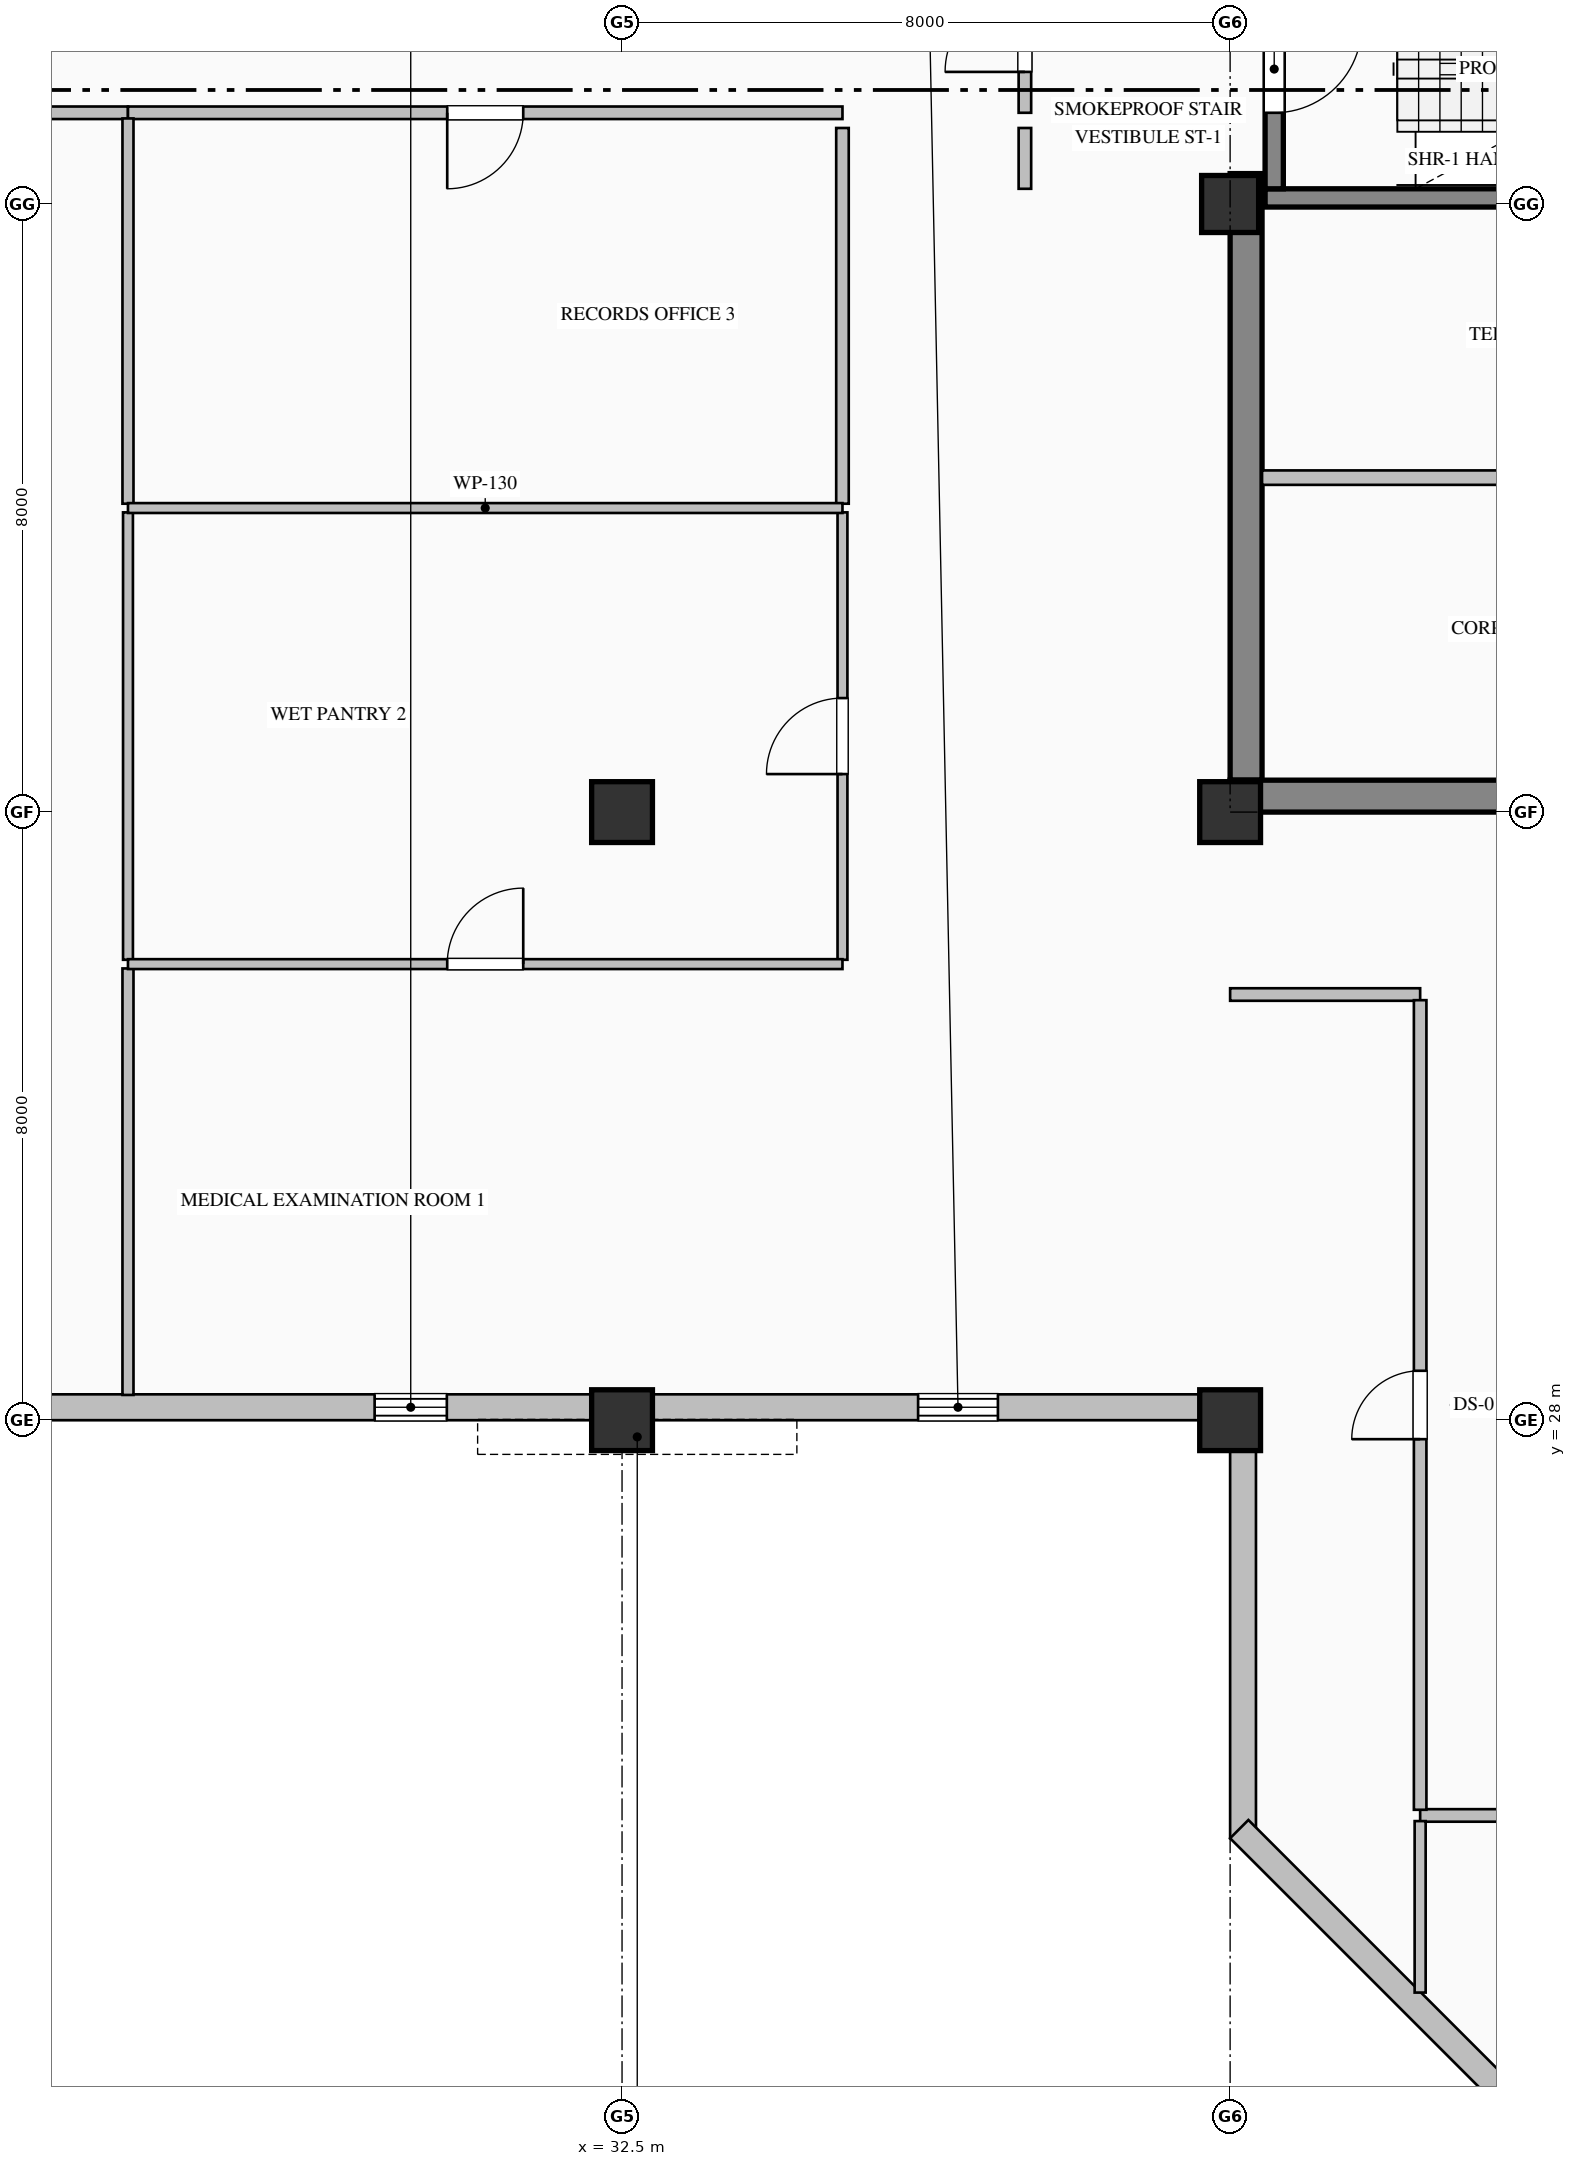
"""IFC4 building model, lengths in metres.
Left out: names, types, materials, properties, quantities, classifications, styles, units other than length and angle.
Written with IfcOpenShell. Run it as: python <this file> out.ifc"""

import sys

from ifc_helpers import new_model, si_unit, direction, frame, frame_2d, origin, origin_2d, place, context, subcontext, project, spatial, rectangle, hollow_rectangle, extrude, element, fill, save


model = new_model("IFC4")
c1 = context("Model", 3, precision=1e-05, world=origin(), true_north=direction((0.0, 1.0)))
c2 = subcontext(c1, "Body", "Model", "MODEL_VIEW")
j1 = project(units=[si_unit("LENGTHUNIT", "METRE"), si_unit("PLANEANGLEUNIT", "RADIAN")], contexts=[c1])
p1 = place(None, origin())
s1 = spatial("IfcSite", under=j1, at=p1, CompositionType="ELEMENT")
p2 = place(p1, origin())
s2 = spatial("IfcBuilding", under=s1, at=p2, CompositionType="ELEMENT")
p3 = place(p2, frame((0.0, 0.0, 347.2)))
s3 = spatial("IfcBuildingStorey", under=s2, at=p3, CompositionType="ELEMENT", Elevation=347.2)
p4 = place(p3, frame((40.71, 36.42, 0.0), z_axis=(0.0, 0.0, 1.0), x_axis=(0.0, 1.0, 0.0)))
e1 = element("IfcWall", 1, at=p4, inside=s3, PredefinedType="SHEAR", context=c2, shape_type="SweptSolid", body=[
    extrude(rectangle(XDim=7.98, YDim=0.42, at=frame_2d((3.99, 0.0))), origin(), (0.0, 0.0, 1.0), 3.785),
])
p5 = place(p3, frame((40.5, 36.21, 0.0), z_axis=(0.0, 0.0, 1.0), x_axis=(1.0, 0.0, 0.0)))
e2 = element("IfcWall", 2, at=p5, inside=s3, PredefinedType="SHEAR", context=c2, shape_type="SweptSolid", body=[
    extrude(rectangle(XDim=9.1, YDim=0.42, at=frame_2d((4.55, 0.0))), origin(), (0.0, 0.0, 1.0), 3.785),
])
for number, where, z_axis, x_axis in (
    (3, (32.5, 28.0, 0.0), (0.0, 0.0, 1.0), (1.0, 0.0, 0.0)),
    (4, (32.5, 36.0, 0.0), (0.0, 0.0, 1.0), (1.0, 0.0, 0.0)),
    (5, (40.5, 28.0, 0.0), (0.0, 0.0, 1.0), (1.0, 0.0, 0.0)),
    (6, (40.5, 36.0, 0.0), (0.0, 0.0, 1.0), (1.0, 0.0, 0.0)),
):
    element("IfcColumn", number, at=place(p3, frame(where, z_axis=z_axis, x_axis=x_axis)), inside=s3, PredefinedType="COLUMN", context=c2, shape_type="SweptSolid", body=[
        extrude(hollow_rectangle(XDim=0.8, YDim=0.8, WallThickness=0.032, at=origin_2d()), origin(), (0.0, 0.0, 1.0), 4.0),
    ])
p6 = place(p3, frame((40.5, 44.0, 0.0), z_axis=(0.0, 0.0, 1.0), x_axis=(1.0, 0.0, 0.0)))
e7 = element("IfcColumn", 7, at=p6, inside=s3, PredefinedType="COLUMN", context=c2, shape_type="SweptSolid", body=[
    extrude(rectangle(XDim=0.75, YDim=0.75, at=origin_2d()), origin(), (0.0, 0.0, 1.0), 4.0),
])
p7 = place(p3, frame((40.67, 22.5, 0.0), z_axis=(0.0, 0.0, 1.0), x_axis=(0.0, 1.0, 0.0)))
e8 = element("IfcWall", 8, at=p7, inside=s3, PredefinedType="SOLIDWALL", context=c2, shape_type="SweptSolid", body=[
    extrude(rectangle(XDim=5.84, YDim=0.34, at=frame_2d((2.92, 0.0))), origin(), (0.0, 0.0, 1.0), 3.185),
])
p8 = place(p3, frame((40.52, 28.17, 0.0), z_axis=(0.0, 0.0, 1.0), x_axis=(-1.0, 0.0, 0.0)))
e9 = element("IfcWall", 9, at=p8, inside=s3, PredefinedType="SOLIDWALL", context=c2, shape_type="SweptSolid", body=[
    extrude(rectangle(XDim=20.02, YDim=0.34, at=frame_2d((10.01, 0.0))), origin(), (0.0, 0.0, 1.0), 3.185),
])
p9 = place(p8, frame((3.075, 0.0, 0.8)))
e10 = element("IfcOpeningElement", 10, at=p9, cuts=e9, PredefinedType="OPENING", context=c2, shape_type="SweptSolid", body=[
    extrude(rectangle(XDim=1.05, YDim=2.15, at=frame_2d((0.525, 1.075))), frame((0.0, 0.18, 0.0), z_axis=(0.0, -1.0, 0.0), x_axis=(1.0, 0.0, 0.0)), (0.0, 0.0, 1.0), 0.36),
])
p10 = place(p8, frame((10.325, 0.0, 0.9)))
e11 = element("IfcOpeningElement", 11, at=p10, cuts=e9, PredefinedType="OPENING", context=c2, shape_type="SweptSolid", body=[
    extrude(rectangle(XDim=0.95, YDim=1.85, at=frame_2d((0.475, 0.925))), frame((0.0, 0.18, 0.0), z_axis=(0.0, -1.0, 0.0), x_axis=(1.0, 0.0, 0.0)), (0.0, 0.0, 1.0), 0.36),
])
p11 = place(p3, frame((44.62, 18.62, 0.0), z_axis=(0.0, 0.0, 1.0), x_axis=(-0.707106781187, 0.707106781187, 0.0)))
e12 = element("IfcWall", 12, at=p11, inside=s3, PredefinedType="SOLIDWALL", context=c2, shape_type="SweptSolid", body=[
    extrude(rectangle(XDim=5.657, YDim=0.34, at=frame_2d((2.828, 0.0))), origin(), (0.0, 0.0, 1.0), 3.785),
])
p12 = place(p3, frame((49.04, 44.08, 0.0), z_axis=(0.0, 0.0, 1.0), x_axis=(-1.0, 0.0, 0.0)))
e13 = element("IfcWall", 13, at=p12, inside=s3, PredefinedType="SOLIDWALL", context=c2, shape_type="SweptSolid", body=[
    extrude(rectangle(XDim=8.08, YDim=0.24, at=frame_2d((4.04, 0.0))), origin(), (0.0, 0.0, 1.0), 4.0),
])
p13 = place(p3, frame((41.08, 47.35, 0.0), z_axis=(0.0, 0.0, 1.0), x_axis=(0.0, -1.0, 0.0)))
e14 = element("IfcWall", 14, at=p13, inside=s3, PredefinedType="SOLIDWALL", context=c2, shape_type="SweptSolid", body=[
    extrude(rectangle(XDim=3.15, YDim=0.24, at=frame_2d((1.575, 0.0))), origin(), (0.0, 0.0, 1.0), 4.0),
])
p14 = place(p13, frame((1.0, 0.0, 0.0)))
e15 = element("IfcOpeningElement", 15, at=p14, cuts=e14, PredefinedType="OPENING", context=c2, shape_type="SweptSolid", body=[
    extrude(rectangle(XDim=1.15, YDim=2.2, at=frame_2d((0.575, 1.1))), frame((0.0, 0.13, 0.0), z_axis=(0.0, -1.0, 0.0), x_axis=(1.0, 0.0, 0.0)), (0.0, 0.0, 1.0), 0.26),
])
p15 = place(p3, frame((37.8, 45.2, 0.0), z_axis=(0.0, 0.0, 1.0), x_axis=(0.0, 1.0, 0.0)))
e16 = element("IfcWall", 16, at=p15, inside=s3, PredefinedType="PARTITIONING", context=c2, shape_type="SweptSolid", body=[
    extrude(rectangle(XDim=2.125, YDim=0.165, at=frame_2d((1.063, 0.0))), origin(), (0.0, 0.0, 1.0), 3.785),
])
p16 = place(p15, frame((0.538, 0.0, 0.0)))
e17 = element("IfcOpeningElement", 17, at=p16, cuts=e16, PredefinedType="OPENING", context=c2, shape_type="SweptSolid", body=[
    extrude(rectangle(XDim=1.05, YDim=2.15, at=frame_2d((0.525, 1.075))), frame((0.0, 0.093, 0.0), z_axis=(0.0, -1.0, 0.0), x_axis=(1.0, 0.0, 0.0)), (0.0, 0.0, 1.0), 0.185),
])
p17 = place(p3, frame((37.8, 44.2, 0.0), z_axis=(0.0, 0.0, 1.0), x_axis=(0.0, 1.0, 0.0)))
e18 = element("IfcWall", 18, at=p17, inside=s3, PredefinedType="PARTITIONING", context=c2, shape_type="SweptSolid", body=[
    extrude(rectangle(XDim=0.8, YDim=0.165, at=frame_2d((0.4, 0.0))), origin(), (0.0, 0.0, 1.0), 3.785),
])
p18 = place(p3, frame((40.92, 40.4, 0.0), z_axis=(0.0, 0.0, 1.0), x_axis=(1.0, 0.0, 0.0)))
e19 = element("IfcWall", 19, at=p18, inside=s3, PredefinedType="PARTITIONING", context=c2, shape_type="SweptSolid", body=[
    extrude(rectangle(XDim=8.48, YDim=0.19, at=frame_2d((4.24, 0.0))), origin(), (0.0, 0.0, 1.0), 3.785),
])
p19 = place(p3, frame((26.0, 45.2, 0.0), z_axis=(0.0, 0.0, 1.0), x_axis=(-1.0, 0.0, 0.0)))
e20 = element("IfcWall", 20, at=p19, inside=s3, PredefinedType="PARTITIONING", context=c2, shape_type="SweptSolid", body=[
    extrude(rectangle(XDim=5.5, YDim=0.165, at=frame_2d((2.75, 0.0))), origin(), (0.0, 0.0, 1.0), 3.785),
])
p20 = place(p19, frame((2.25, 0.0, 0.0)))
e21 = element("IfcOpeningElement", 21, at=p20, cuts=e20, PredefinedType="OPENING", context=c2, shape_type="SweptSolid", body=[
    extrude(rectangle(XDim=1.0, YDim=2.15, at=frame_2d((0.5, 1.075))), frame((0.0, 0.093, 0.0), z_axis=(0.0, -1.0, 0.0), x_axis=(1.0, 0.0, 0.0)), (0.0, 0.0, 1.0), 0.185),
])
p21 = place(p3, frame((35.4, 45.2, 0.0), z_axis=(0.0, 0.0, 1.0), x_axis=(-1.0, 0.0, 0.0)))
e22 = element("IfcWall", 22, at=p21, inside=s3, PredefinedType="PARTITIONING", context=c2, shape_type="SweptSolid", body=[
    extrude(rectangle(XDim=9.4, YDim=0.165, at=frame_2d((4.7, 0.0))), origin(), (0.0, 0.0, 1.0), 3.785),
])
p22 = place(p21, frame((4.2, 0.0, 0.0)))
e23 = element("IfcOpeningElement", 23, at=p22, cuts=e22, PredefinedType="OPENING", context=c2, shape_type="SweptSolid", body=[
    extrude(rectangle(XDim=1.0, YDim=2.15, at=frame_2d((0.5, 1.075))), frame((0.0, 0.093, 0.0), z_axis=(0.0, -1.0, 0.0), x_axis=(1.0, 0.0, 0.0)), (0.0, 0.0, 1.0), 0.185),
])
p23 = place(p3, frame((35.4, 34.057, 0.0), z_axis=(0.0, 0.0, 1.0), x_axis=(0.0, 1.0, 0.0)))
e24 = element("IfcWall", 24, at=p23, inside=s3, PredefinedType="PARTITIONING", context=c2, shape_type="SweptSolid", body=[
    extrude(rectangle(XDim=5.886, YDim=0.13, at=frame_2d((2.943, 0.0))), origin(), (0.0, 0.0, 1.0), 3.785),
])
p24 = place(p23, frame((2.443, 0.0, 0.0)))
e25 = element("IfcOpeningElement", 25, at=p24, cuts=e24, PredefinedType="OPENING", context=c2, shape_type="SweptSolid", body=[
    extrude(rectangle(XDim=1.0, YDim=2.15, at=frame_2d((0.5, 1.075))), frame((0.0, 0.075, 0.0), z_axis=(0.0, -1.0, 0.0), x_axis=(1.0, 0.0, 0.0)), (0.0, 0.0, 1.0), 0.15),
])
p25 = place(p3, frame((35.4, 40.057, 0.0), z_axis=(0.0, 0.0, 1.0), x_axis=(0.0, 1.0, 0.0)))
e26 = element("IfcWall", 26, at=p25, inside=s3, PredefinedType="PARTITIONING", context=c2, shape_type="SweptSolid", body=[
    extrude(rectangle(XDim=4.943, YDim=0.165, at=frame_2d((2.472, 0.0))), origin(), (0.0, 0.0, 1.0), 3.785),
])
p26 = place(p3, frame((43.0, 33.6, 0.0), z_axis=(0.0, 0.0, 1.0), x_axis=(-1.0, 0.0, 0.0)))
e27 = element("IfcWall", 27, at=p26, inside=s3, PredefinedType="PARTITIONING", context=c2, shape_type="SweptSolid", body=[
    extrude(rectangle(XDim=2.5, YDim=0.165, at=frame_2d((1.25, 0.0))), origin(), (0.0, 0.0, 1.0), 3.785),
])
p27 = place(p3, frame((45.2, 22.8, 0.0), z_axis=(0.0, 0.0, 1.0), x_axis=(-1.0, 0.0, 0.0)))
e28 = element("IfcWall", 28, at=p27, inside=s3, PredefinedType="PARTITIONING", context=c2, shape_type="SweptSolid", body=[
    extrude(rectangle(XDim=2.2, YDim=0.165, at=frame_2d((1.1, 0.0))), origin(), (0.0, 0.0, 1.0), 3.785),
])
p28 = place(p3, frame((43.0, 22.875, 0.0), z_axis=(0.0, 0.0, 1.0), x_axis=(0.0, 1.0, 0.0)))
e29 = element("IfcWall", 29, at=p28, inside=s3, PredefinedType="PARTITIONING", context=c2, shape_type="SweptSolid", body=[
    extrude(rectangle(XDim=10.651, YDim=0.165, at=frame_2d((5.325, 0.0))), origin(), (0.0, 0.0, 1.0), 3.785),
])
p29 = place(p28, frame((4.875, 0.0, 0.0)))
e30 = element("IfcOpeningElement", 30, at=p29, cuts=e29, PredefinedType="OPENING", context=c2, shape_type="SweptSolid", body=[
    extrude(rectangle(XDim=0.9, YDim=2.15, at=frame_2d((0.45, 1.075))), frame((0.0, 0.093, 0.0), z_axis=(0.0, -1.0, 0.0), x_axis=(1.0, 0.0, 0.0)), (0.0, 0.0, 1.0), 0.185),
])
p30 = place(p3, frame((43.0, 20.469, 0.0), z_axis=(0.0, 0.0, 1.0), x_axis=(0.0, 1.0, 0.0)))
e31 = element("IfcWall", 31, at=p30, inside=s3, PredefinedType="PARTITIONING", context=c2, shape_type="SweptSolid", body=[
    extrude(rectangle(XDim=2.256, YDim=0.145, at=frame_2d((1.128, 0.0))), origin(), (0.0, 0.0, 1.0), 3.785),
])
p31 = place(p3, frame((26.0, 33.943, 0.0), z_axis=(0.0, 0.0, 1.0), x_axis=(0.0, -1.0, 0.0)))
e32 = element("IfcWall", 32, at=p31, inside=s3, PredefinedType="PARTITIONING", context=c2, shape_type="SweptSolid", body=[
    extrude(rectangle(XDim=5.611, YDim=0.145, at=frame_2d((2.806, 0.0))), origin(), (0.0, 0.0, 1.0), 3.785),
])
p32 = place(p3, frame((26.0, 39.943, 0.0), z_axis=(0.0, 0.0, 1.0), x_axis=(0.0, -1.0, 0.0)))
e33 = element("IfcWall", 33, at=p32, inside=s3, PredefinedType="PARTITIONING", context=c2, shape_type="SweptSolid", body=[
    extrude(rectangle(XDim=5.886, YDim=0.13, at=frame_2d((2.943, 0.0))), origin(), (0.0, 0.0, 1.0), 3.785),
])
p33 = place(p3, frame((26.0, 45.125, 0.0), z_axis=(0.0, 0.0, 1.0), x_axis=(0.0, -1.0, 0.0)))
e34 = element("IfcWall", 34, at=p33, inside=s3, PredefinedType="PARTITIONING", context=c2, shape_type="SweptSolid", body=[
    extrude(rectangle(XDim=5.069, YDim=0.145, at=frame_2d((2.534, 0.0))), origin(), (0.0, 0.0, 1.0), 3.785),
])
p34 = place(p3, frame((26.0, 34.0, 0.0), z_axis=(0.0, 0.0, 1.0), x_axis=(1.0, 0.0, 0.0)))
e35 = element("IfcWall", 35, at=p34, inside=s3, PredefinedType="PARTITIONING", context=c2, shape_type="SweptSolid", body=[
    extrude(rectangle(XDim=9.4, YDim=0.13, at=frame_2d((4.7, 0.0))), origin(), (0.0, 0.0, 1.0), 3.785),
])
p35 = place(p34, frame((4.2, 0.0, 0.0)))
e36 = element("IfcOpeningElement", 36, at=p35, cuts=e35, PredefinedType="OPENING", context=c2, shape_type="SweptSolid", body=[
    extrude(rectangle(XDim=1.0, YDim=2.15, at=frame_2d((0.5, 1.075))), frame((0.0, 0.075, 0.0), z_axis=(0.0, -1.0, 0.0), x_axis=(1.0, 0.0, 0.0)), (0.0, 0.0, 1.0), 0.15),
])
p36 = place(p3, frame((26.0, 40.0, 0.0), z_axis=(0.0, 0.0, 1.0), x_axis=(1.0, 0.0, 0.0)))
e37 = element("IfcWall", 37, at=p36, inside=s3, PredefinedType="PARTITIONING", context=c2, shape_type="SweptSolid", body=[
    extrude(rectangle(XDim=9.4, YDim=0.13, at=frame_2d((4.7, 0.0))), origin(), (0.0, 0.0, 1.0), 3.785),
])
p37 = place(p9, origin())
e38 = element("IfcWindow", 38, at=p37, inside=s3, PartitioningType="SINGLE_PANEL", PredefinedType="WINDOW", context=c2, shape_type="SweptSolid", body=[
    extrude(rectangle(XDim=1.05, YDim=2.15, at=frame_2d((0.525, 1.075))), frame((0.0, 0.15, 0.0), z_axis=(0.0, -1.0, 0.0), x_axis=(1.0, 0.0, 0.0)), (0.0, 0.0, 1.0), 0.06),
])
fill(e10, e38)
p38 = place(p10, origin())
e39 = element("IfcWindow", 39, at=p38, inside=s3, PartitioningType="SINGLE_PANEL", PredefinedType="WINDOW", context=c2, shape_type="SweptSolid", body=[
    extrude(rectangle(XDim=0.95, YDim=1.85, at=frame_2d((0.475, 0.925))), frame((0.0, 0.15, 0.0), z_axis=(0.0, -1.0, 0.0), x_axis=(1.0, 0.0, 0.0)), (0.0, 0.0, 1.0), 0.06),
])
fill(e11, e39)
p39 = place(p14, origin())
e40 = element("IfcDoor", 40, at=p39, inside=s3, OperationType="SINGLE_SWING_LEFT", PredefinedType="DOOR", context=c2, shape_type="SweptSolid", body=[
    extrude(rectangle(XDim=1.15, YDim=2.2, at=frame_2d((0.575, 1.1))), frame((0.0, 0.025, 0.0), z_axis=(0.0, -1.0, 0.0), x_axis=(1.0, 0.0, 0.0)), (0.0, 0.0, 1.0), 0.05),
])
fill(e15, e40)
p40 = place(p16, origin())
e41 = element("IfcDoor", 41, at=p40, inside=s3, OperationType="SINGLE_SWING_LEFT", PredefinedType="DOOR", context=c2, shape_type="SweptSolid", body=[
    extrude(rectangle(XDim=1.05, YDim=2.15, at=frame_2d((0.525, 1.075))), frame((0.0, 0.025, 0.0), z_axis=(0.0, -1.0, 0.0), x_axis=(1.0, 0.0, 0.0)), (0.0, 0.0, 1.0), 0.05),
])
fill(e17, e41)
p41 = place(p35, origin())
e42 = element("IfcDoor", 42, at=p41, inside=s3, OperationType="SINGLE_SWING_RIGHT", PredefinedType="DOOR", context=c2, shape_type="SweptSolid", body=[
    extrude(rectangle(XDim=1.0, YDim=2.15, at=frame_2d((0.5, 1.075))), frame((0.0, 0.025, 0.0), z_axis=(0.0, -1.0, 0.0), x_axis=(1.0, 0.0, 0.0)), (0.0, 0.0, 1.0), 0.05),
])
fill(e36, e42)
p42 = place(p24, origin())
e43 = element("IfcDoor", 43, at=p42, inside=s3, OperationType="SINGLE_SWING_LEFT", PredefinedType="DOOR", context=c2, shape_type="SweptSolid", body=[
    extrude(rectangle(XDim=1.0, YDim=2.15, at=frame_2d((0.5, 1.075))), frame((0.0, 0.025, 0.0), z_axis=(0.0, -1.0, 0.0), x_axis=(1.0, 0.0, 0.0)), (0.0, 0.0, 1.0), 0.05),
])
fill(e25, e43)
p43 = place(p22, origin())
e44 = element("IfcDoor", 44, at=p43, inside=s3, OperationType="SINGLE_SWING_RIGHT", PredefinedType="DOOR", context=c2, shape_type="SweptSolid", body=[
    extrude(rectangle(XDim=1.0, YDim=2.15, at=frame_2d((0.5, 1.075))), frame((0.0, 0.025, 0.0), z_axis=(0.0, -1.0, 0.0), x_axis=(1.0, 0.0, 0.0)), (0.0, 0.0, 1.0), 0.05),
])
fill(e23, e44)
p44 = place(p29, origin())
e45 = element("IfcDoor", 45, at=p44, inside=s3, OperationType="SINGLE_SWING_LEFT", PredefinedType="DOOR", context=c2, shape_type="SweptSolid", body=[
    extrude(rectangle(XDim=0.9, YDim=2.15, at=frame_2d((0.45, 1.075))), frame((0.0, 0.025, 0.0), z_axis=(0.0, -1.0, 0.0), x_axis=(1.0, 0.0, 0.0)), (0.0, 0.0, 1.0), 0.05),
])
fill(e30, e45)
save(model, sys.argv[1])
